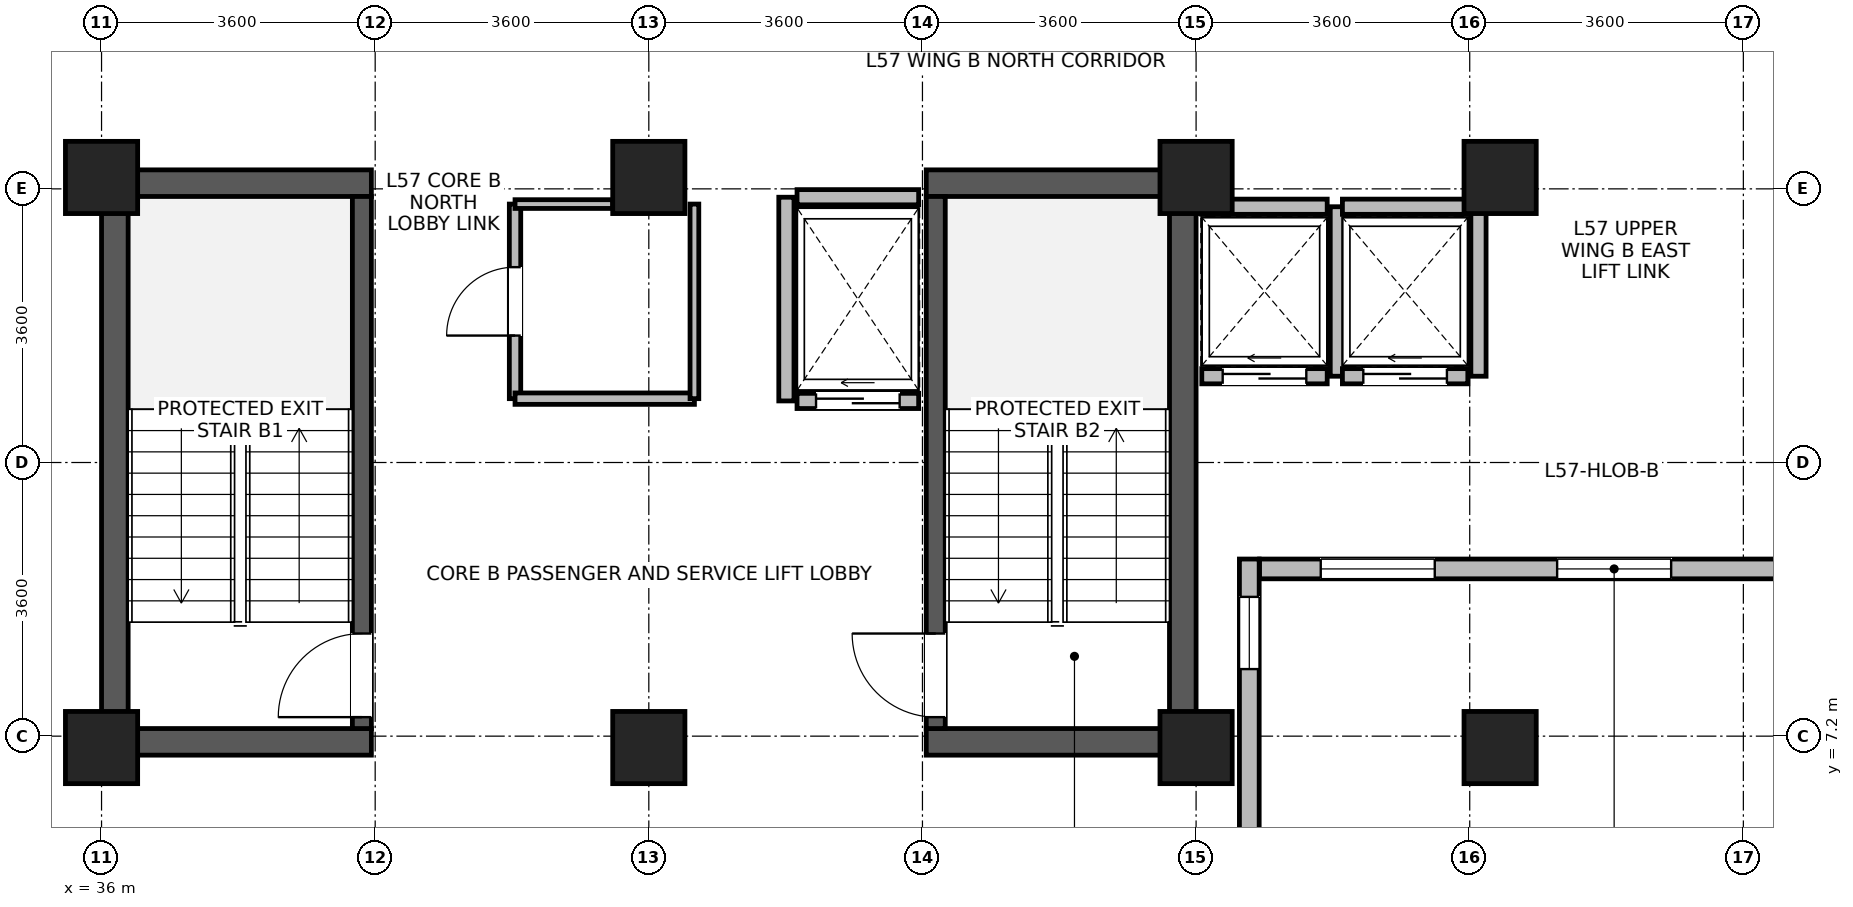
"""IFC4 building model, lengths in metres.
Left out: names, types, materials, properties, quantities, classifications, styles, units other than length and angle.
Written with IfcOpenShell. Run it as: python <this file> out.ifc"""

import sys

from ifc_helpers import new_model, si_unit, direction, frame, frame_2d, origin, origin_2d, place, context, subcontext, project, spatial, rectangle, extrude, source, transform, mapped, element, fill, save


model = new_model("IFC4")
c1 = context("Model", 3, precision=1e-05, world=origin(), true_north=direction((0.0, 1.0)))
c2 = subcontext(c1, "Body", "Model", "MODEL_VIEW")
j1 = project(units=[si_unit("LENGTHUNIT", "METRE"), si_unit("PLANEANGLEUNIT", "RADIAN")], contexts=[c1])
p1 = place(None, origin())
s1 = spatial("IfcSite", under=j1, at=p1, CompositionType="ELEMENT")
p2 = place(p1, origin())
s2 = spatial("IfcBuilding", under=s1, at=p2, CompositionType="ELEMENT")
p3 = place(p2, frame((0.0, 0.0, 224.0)))
s3 = spatial("IfcBuildingStorey", under=s2, at=p3, CompositionType="ELEMENT", Elevation=224.0)
for number, where, z_axis, x_axis in (
    (1, (36.175, 6.95, 0.0), (0.0, 0.0, 1.0), (0.0, 1.0, 0.0)),
    (2, (50.225, 6.95, 0.0), (0.0, 0.0, 1.0), (0.0, 1.0, 0.0)),
):
    element("IfcWall", number, at=place(p3, frame(where, z_axis=z_axis, x_axis=x_axis)), inside=s3, PredefinedType="SHEAR", context=c2, shape_type="SweptSolid", body=[
        extrude(rectangle(XDim=7.7, YDim=0.35, at=frame_2d((3.85, 0.0))), origin(), (0.0, 0.0, 1.0), 3.47),
    ])
for number, where, z_axis, x_axis in (
    (3, (36.35, 7.125, 0.0), (0.0, 0.0, 1.0), (1.0, 0.0, 0.0)),
    (4, (46.85, 7.125, 0.0), (0.0, 0.0, 1.0), (1.0, 0.0, 0.0)),
    (5, (36.35, 14.475, 0.0), (0.0, 0.0, 1.0), (1.0, 0.0, 0.0)),
    (6, (46.85, 14.475, 0.0), (0.0, 0.0, 1.0), (1.0, 0.0, 0.0)),
):
    element("IfcWall", number, at=place(p3, frame(where, z_axis=z_axis, x_axis=x_axis)), inside=s3, PredefinedType="SHEAR", context=c2, shape_type="SweptSolid", body=[
        extrude(rectangle(XDim=3.2, YDim=0.35, at=frame_2d((1.6, 0.0))), origin(), (0.0, 0.0, 1.0), 3.47),
    ])
p4 = place(p3, frame((39.425, 7.3, 0.0), z_axis=(0.0, 0.0, 1.0), x_axis=(0.0, 1.0, 0.0)))
e7 = element("IfcWall", 7, at=p4, inside=s3, PredefinedType="SHEAR", context=c2, shape_type="SweptSolid", body=[
    extrude(rectangle(XDim=7.0, YDim=0.25, at=frame_2d((3.5, 0.0))), origin(), (0.0, 0.0, 1.0), 3.47),
])
p5 = place(p4, frame((0.15, 0.0, 0.0)))
e8 = element("IfcOpeningElement", 8, at=p5, cuts=e7, PredefinedType="OPENING", context=c2, shape_type="SweptSolid", body=[
    extrude(rectangle(XDim=1.1, YDim=2.08, at=frame_2d((0.55, 1.04))), frame((0.0, 0.135, 0.0), z_axis=(0.0, -1.0, 0.0), x_axis=(1.0, 0.0, 0.0)), (0.0, 0.0, 1.0), 0.27),
])
p6 = place(p3, frame((46.975, 7.3, 0.0), z_axis=(0.0, 0.0, 1.0), x_axis=(0.0, 1.0, 0.0)))
e9 = element("IfcWall", 9, at=p6, inside=s3, PredefinedType="SHEAR", context=c2, shape_type="SweptSolid", body=[
    extrude(rectangle(XDim=7.0, YDim=0.25, at=frame_2d((3.5, 0.0))), origin(), (0.0, 0.0, 1.0), 3.47),
])
p7 = place(p6, frame((0.15, 0.0, 0.0)))
e10 = element("IfcOpeningElement", 10, at=p7, cuts=e9, PredefinedType="OPENING", context=c2, shape_type="SweptSolid", body=[
    extrude(rectangle(XDim=1.1, YDim=2.08, at=frame_2d((0.55, 1.04))), frame((0.0, 0.135, 0.0), z_axis=(0.0, -1.0, 0.0), x_axis=(1.0, 0.0, 0.0)), (0.0, 0.0, 1.0), 0.27),
])
m1 = source(origin(), c2, "Body", "SweptSolid", [
    extrude(rectangle(XDim=0.95, YDim=0.95, at=origin_2d()), origin(), (0.0, 0.0, 1.0), 3.7),
])
for number, where, z_axis, x_axis in (
    (11, (36.0, 7.05, 0.0), (0.0, 0.0, 1.0), (1.0, 0.0, 0.0)),
    (12, (36.0, 14.55, 0.0), (0.0, 0.0, 1.0), (1.0, 0.0, 0.0)),
    (13, (43.2, 7.05, 0.0), (0.0, 0.0, 1.0), (1.0, 0.0, 0.0)),
    (14, (43.2, 14.55, 0.0), (0.0, 0.0, 1.0), (1.0, 0.0, 0.0)),
    (15, (50.4, 7.05, 0.0), (0.0, 0.0, 1.0), (1.0, 0.0, 0.0)),
    (16, (50.4, 14.55, 0.0), (0.0, 0.0, 1.0), (1.0, 0.0, 0.0)),
    (17, (54.4, 7.05, 0.0), (0.0, 0.0, 1.0), (1.0, 0.0, 0.0)),
    (18, (54.4, 14.55, 0.0), (0.0, 0.0, 1.0), (1.0, 0.0, 0.0)),
):
    element("IfcColumn", number, at=place(p3, frame(where, z_axis=z_axis, x_axis=x_axis)), inside=s3, PredefinedType="COLUMN", context=c2, shape_type="MappedRepresentation", body=[
        mapped(m1, transform((0.0, 0.0, 0.0), x_axis=(1.0, 0.0, 0.0), y_axis=(0.0, 1.0, 0.0), z_axis=(0.0, 0.0, 1.0), scale=1.0)),
    ])
p8 = place(p3, frame((51.1, 9.53, 0.0), z_axis=(0.0, 0.0, 1.0), x_axis=(0.0, -1.0, 0.0)))
e19 = element("IfcWall", 19, at=p8, inside=s3, PredefinedType="STANDARD", context=c2, shape_type="SweptSolid", body=[
    extrude(rectangle(XDim=3.86, YDim=0.26, at=frame_2d((1.93, 0.0))), origin(), (0.0, 0.0, 1.0), 3.45),
])
p9 = place(p8, frame((0.498, 0.0, 0.85)))
e20 = element("IfcOpeningElement", 20, at=p9, cuts=e19, PredefinedType="OPENING", context=c2, shape_type="SweptSolid", body=[
    extrude(rectangle(XDim=0.95, YDim=1.75, at=frame_2d((0.475, 0.875))), frame((0.0, 0.14, 0.0), z_axis=(0.0, -1.0, 0.0), x_axis=(1.0, 0.0, 0.0)), (0.0, 0.0, 1.0), 0.28),
])
p10 = place(p3, frame((60.565, 9.4, 0.0), z_axis=(0.0, 0.0, 1.0), x_axis=(-1.0, 0.0, 0.0)))
e21 = element("IfcWall", 21, at=p10, inside=s3, PredefinedType="STANDARD", context=c2, shape_type="SweptSolid", body=[
    extrude(rectangle(XDim=9.33, YDim=0.26, at=frame_2d((4.665, 0.0))), origin(), (0.0, 0.0, 1.0), 3.45),
])
p11 = place(p10, frame((0.805, 0.0, 0.85)))
e22 = element("IfcOpeningElement", 22, at=p11, cuts=e21, PredefinedType="OPENING", context=c2, shape_type="SweptSolid", body=[
    extrude(rectangle(XDim=1.5, YDim=1.85, at=frame_2d((0.75, 0.925))), frame((0.0, 0.14, 0.0), z_axis=(0.0, -1.0, 0.0), x_axis=(1.0, 0.0, 0.0)), (0.0, 0.0, 1.0), 0.28),
])
p12 = place(p10, frame((3.915, 0.0, 0.85)))
e23 = element("IfcOpeningElement", 23, at=p12, cuts=e21, PredefinedType="OPENING", context=c2, shape_type="SweptSolid", body=[
    extrude(rectangle(XDim=1.5, YDim=1.85, at=frame_2d((0.75, 0.925))), frame((0.0, 0.14, 0.0), z_axis=(0.0, -1.0, 0.0), x_axis=(1.0, 0.0, 0.0)), (0.0, 0.0, 1.0), 0.28),
])
p13 = place(p10, frame((7.025, 0.0, 0.85)))
e24 = element("IfcOpeningElement", 24, at=p13, cuts=e21, PredefinedType="OPENING", context=c2, shape_type="SweptSolid", body=[
    extrude(rectangle(XDim=1.5, YDim=1.85, at=frame_2d((0.75, 0.925))), frame((0.0, 0.14, 0.0), z_axis=(0.0, -1.0, 0.0), x_axis=(1.0, 0.0, 0.0)), (0.0, 0.0, 1.0), 0.28),
])
p14 = place(p3, frame((50.475, 11.935, 0.0), z_axis=(0.0, 0.0, 1.0), x_axis=(1.0, 0.0, 0.0)))
e25 = element("IfcWall", 25, at=p14, inside=s3, PredefinedType="PARTITIONING", context=c2, shape_type="SweptSolid", body=[
    extrude(rectangle(XDim=1.65, YDim=0.2, at=frame_2d((0.825, 0.0))), origin(), (0.0, 0.0, 1.0), 3.45),
])
p15 = place(p14, frame((0.275, 0.0, 0.0)))
e26 = element("IfcOpeningElement", 26, at=p15, cuts=e25, PredefinedType="OPENING", context=c2, shape_type="SweptSolid", body=[
    extrude(rectangle(XDim=1.1, YDim=2.12, at=frame_2d((0.55, 1.06))), frame((0.0, 0.11, 0.0), z_axis=(0.0, -1.0, 0.0), x_axis=(1.0, 0.0, 0.0)), (0.0, 0.0, 1.0), 0.22),
])
p16 = place(p3, frame((50.475, 14.165, 0.0), z_axis=(0.0, 0.0, 1.0), x_axis=(1.0, 0.0, 0.0)))
e27 = element("IfcWall", 27, at=p16, inside=s3, PredefinedType="PARTITIONING", context=c2, shape_type="SweptSolid", body=[
    extrude(rectangle(XDim=1.65, YDim=0.2, at=frame_2d((0.825, 0.0))), origin(), (0.0, 0.0, 1.0), 3.45),
])
p17 = place(p3, frame((52.265, 11.935, 0.0), z_axis=(0.0, 0.0, 1.0), x_axis=(0.0, 1.0, 0.0)))
e28 = element("IfcWall", 28, at=p17, inside=s3, PredefinedType="PARTITIONING", context=c2, shape_type="SweptSolid", body=[
    extrude(rectangle(XDim=2.23, YDim=0.2, at=frame_2d((1.115, 0.0))), origin(), (0.0, 0.0, 1.0), 3.45),
])
p18 = place(p3, frame((52.325, 11.935, 0.0), z_axis=(0.0, 0.0, 1.0), x_axis=(1.0, 0.0, 0.0)))
e29 = element("IfcWall", 29, at=p18, inside=s3, PredefinedType="PARTITIONING", context=c2, shape_type="SweptSolid", body=[
    extrude(rectangle(XDim=1.65, YDim=0.2, at=frame_2d((0.825, 0.0))), origin(), (0.0, 0.0, 1.0), 3.45),
])
p19 = place(p18, frame((0.275, 0.0, 0.0)))
e30 = element("IfcOpeningElement", 30, at=p19, cuts=e29, PredefinedType="OPENING", context=c2, shape_type="SweptSolid", body=[
    extrude(rectangle(XDim=1.1, YDim=2.12, at=frame_2d((0.55, 1.06))), frame((0.0, 0.11, 0.0), z_axis=(0.0, -1.0, 0.0), x_axis=(1.0, 0.0, 0.0)), (0.0, 0.0, 1.0), 0.22),
])
p20 = place(p3, frame((52.325, 14.165, 0.0), z_axis=(0.0, 0.0, 1.0), x_axis=(1.0, 0.0, 0.0)))
e31 = element("IfcWall", 31, at=p20, inside=s3, PredefinedType="PARTITIONING", context=c2, shape_type="SweptSolid", body=[
    extrude(rectangle(XDim=1.65, YDim=0.2, at=frame_2d((0.825, 0.0))), origin(), (0.0, 0.0, 1.0), 3.45),
])
p21 = place(p3, frame((54.115, 11.935, 0.0), z_axis=(0.0, 0.0, 1.0), x_axis=(0.0, 1.0, 0.0)))
e32 = element("IfcWall", 32, at=p21, inside=s3, PredefinedType="PARTITIONING", context=c2, shape_type="SweptSolid", body=[
    extrude(rectangle(XDim=2.23, YDim=0.2, at=frame_2d((1.115, 0.0))), origin(), (0.0, 0.0, 1.0), 3.45),
])
p22 = place(p3, frame((45.15, 11.61, 0.0), z_axis=(0.0, 0.0, 1.0), x_axis=(1.0, 0.0, 0.0)))
e33 = element("IfcWall", 33, at=p22, inside=s3, PredefinedType="PARTITIONING", context=c2, shape_type="SweptSolid", body=[
    extrude(rectangle(XDim=1.6, YDim=0.2, at=frame_2d((0.8, 0.0))), origin(), (0.0, 0.0, 1.0), 3.45),
])
p23 = place(p22, frame((0.25, 0.0, 0.0)))
e34 = element("IfcOpeningElement", 34, at=p23, cuts=e33, PredefinedType="OPENING", context=c2, shape_type="SweptSolid", body=[
    extrude(rectangle(XDim=1.1, YDim=2.12, at=frame_2d((0.55, 1.06))), frame((0.0, 0.11, 0.0), z_axis=(0.0, -1.0, 0.0), x_axis=(1.0, 0.0, 0.0)), (0.0, 0.0, 1.0), 0.22),
])
p24 = place(p3, frame((45.15, 14.29, 0.0), z_axis=(0.0, 0.0, 1.0), x_axis=(1.0, 0.0, 0.0)))
e35 = element("IfcWall", 35, at=p24, inside=s3, PredefinedType="PARTITIONING", context=c2, shape_type="SweptSolid", body=[
    extrude(rectangle(XDim=1.6, YDim=0.2, at=frame_2d((0.8, 0.0))), origin(), (0.0, 0.0, 1.0), 2.55),
])
p25 = place(p3, frame((45.01, 11.61, 0.0), z_axis=(0.0, 0.0, 1.0), x_axis=(0.0, 1.0, 0.0)))
e36 = element("IfcWall", 36, at=p25, inside=s3, PredefinedType="PARTITIONING", context=c2, shape_type="SweptSolid", body=[
    extrude(rectangle(XDim=2.68, YDim=0.2, at=frame_2d((1.34, 0.0))), origin(), (0.0, 0.0, 1.0), 3.45),
])
p26 = place(p3, frame((41.44, 11.64, 0.0), z_axis=(0.0, 0.0, 1.0), x_axis=(0.0, 1.0, 0.0)))
e37 = element("IfcWall", 37, at=p26, inside=s3, PredefinedType="PARTITIONING", context=c2, shape_type="SweptSolid", body=[
    extrude(rectangle(XDim=2.56, YDim=0.15, at=frame_2d((1.28, 0.0))), origin(), (0.0, 0.0, 1.0), 3.45),
])
p27 = place(p26, frame((0.83, 0.0, 0.0)))
e38 = element("IfcOpeningElement", 38, at=p27, cuts=e37, PredefinedType="OPENING", context=c2, shape_type="SweptSolid", body=[
    extrude(rectangle(XDim=0.9, YDim=2.08, at=frame_2d((0.45, 1.04))), frame((0.0, 0.085, 0.0), z_axis=(0.0, -1.0, 0.0), x_axis=(1.0, 0.0, 0.0)), (0.0, 0.0, 1.0), 0.17),
])
p28 = place(p3, frame((41.44, 11.64, 0.0), z_axis=(0.0, 0.0, 1.0), x_axis=(1.0, 0.0, 0.0)))
e39 = element("IfcWall", 39, at=p28, inside=s3, PredefinedType="PARTITIONING", context=c2, shape_type="SweptSolid", body=[
    extrude(rectangle(XDim=2.36, YDim=0.15, at=frame_2d((1.18, 0.0))), origin(), (0.0, 0.0, 1.0), 3.45),
])
p29 = place(p3, frame((43.8, 11.64, 0.0), z_axis=(0.0, 0.0, 1.0), x_axis=(0.0, 1.0, 0.0)))
e40 = element("IfcWall", 40, at=p29, inside=s3, PredefinedType="PARTITIONING", context=c2, shape_type="SweptSolid", body=[
    extrude(rectangle(XDim=2.56, YDim=0.115, at=frame_2d((1.28, 0.0))), origin(), (0.0, 0.0, 1.0), 3.45),
])
p30 = place(p3, frame((41.44, 14.2, 0.0), z_axis=(0.0, 0.0, 1.0), x_axis=(1.0, 0.0, 0.0)))
e41 = element("IfcWall", 41, at=p30, inside=s3, PredefinedType="PARTITIONING", context=c2, shape_type="SweptSolid", body=[
    extrude(rectangle(XDim=1.285, YDim=0.115, at=frame_2d((0.643, 0.0))), origin(), (0.0, 0.0, 1.0), 2.55),
])
p31 = place(p9, origin())
e42 = element("IfcWindow", 42, at=p31, inside=s3, PartitioningType="SINGLE_PANEL", PredefinedType="WINDOW", context=c2, shape_type="SweptSolid", body=[
    extrude(rectangle(XDim=0.95, YDim=1.75, at=frame_2d((0.475, 0.875))), frame((0.0, 0.03, 0.0), z_axis=(0.0, -1.0, 0.0), x_axis=(1.0, 0.0, 0.0)), (0.0, 0.0, 1.0), 0.06),
])
fill(e20, e42)
p32 = place(p12, origin())
e43 = element("IfcWindow", 43, at=p32, inside=s3, PartitioningType="SINGLE_PANEL", PredefinedType="WINDOW", context=c2, shape_type="SweptSolid", body=[
    extrude(rectangle(XDim=1.5, YDim=1.85, at=frame_2d((0.75, 0.925))), frame((0.0, 0.03, 0.0), z_axis=(0.0, -1.0, 0.0), x_axis=(1.0, 0.0, 0.0)), (0.0, 0.0, 1.0), 0.06),
])
fill(e23, e43)
p33 = place(p13, origin())
e44 = element("IfcWindow", 44, at=p33, inside=s3, PartitioningType="SINGLE_PANEL", PredefinedType="WINDOW", context=c2, shape_type="SweptSolid", body=[
    extrude(rectangle(XDim=1.5, YDim=1.85, at=frame_2d((0.75, 0.925))), frame((0.0, 0.03, 0.0), z_axis=(0.0, -1.0, 0.0), x_axis=(1.0, 0.0, 0.0)), (0.0, 0.0, 1.0), 0.06),
])
fill(e24, e44)
p34 = place(p5, origin())
e45 = element("IfcDoor", 45, at=p34, inside=s3, OperationType="SINGLE_SWING_LEFT", PredefinedType="DOOR", context=c2, shape_type="SweptSolid", body=[
    extrude(rectangle(XDim=1.1, YDim=2.08, at=frame_2d((0.55, 1.04))), frame((0.0, 0.025, 0.0), z_axis=(0.0, -1.0, 0.0), x_axis=(1.0, 0.0, 0.0)), (0.0, 0.0, 1.0), 0.05),
])
fill(e8, e45)
p35 = place(p7, origin())
e46 = element("IfcDoor", 46, at=p35, inside=s3, OperationType="SINGLE_SWING_RIGHT", PredefinedType="DOOR", context=c2, shape_type="SweptSolid", body=[
    extrude(rectangle(XDim=1.1, YDim=2.08, at=frame_2d((0.55, 1.04))), frame((0.0, 0.025, 0.0), z_axis=(0.0, -1.0, 0.0), x_axis=(1.0, 0.0, 0.0)), (0.0, 0.0, 1.0), 0.05),
])
fill(e10, e46)
p36 = place(p15, origin())
e47 = element("IfcDoor", 47, at=p36, inside=s3, OperationType="SLIDING_TO_LEFT", PredefinedType="DOOR", context=c2, shape_type="SweptSolid", body=[
    extrude(rectangle(XDim=1.1, YDim=2.12, at=frame_2d((0.55, 1.06))), frame((0.0, 0.025, 0.0), z_axis=(0.0, -1.0, 0.0), x_axis=(1.0, 0.0, 0.0)), (0.0, 0.0, 1.0), 0.05),
])
fill(e26, e47)
p37 = place(p19, origin())
e48 = element("IfcDoor", 48, at=p37, inside=s3, OperationType="SLIDING_TO_LEFT", PredefinedType="DOOR", context=c2, shape_type="SweptSolid", body=[
    extrude(rectangle(XDim=1.1, YDim=2.12, at=frame_2d((0.55, 1.06))), frame((0.0, 0.025, 0.0), z_axis=(0.0, -1.0, 0.0), x_axis=(1.0, 0.0, 0.0)), (0.0, 0.0, 1.0), 0.05),
])
fill(e30, e48)
p38 = place(p23, origin())
e49 = element("IfcDoor", 49, at=p38, inside=s3, OperationType="SLIDING_TO_LEFT", PredefinedType="DOOR", context=c2, shape_type="SweptSolid", body=[
    extrude(rectangle(XDim=1.1, YDim=2.12, at=frame_2d((0.55, 1.06))), frame((0.0, 0.025, 0.0), z_axis=(0.0, -1.0, 0.0), x_axis=(1.0, 0.0, 0.0)), (0.0, 0.0, 1.0), 0.05),
])
fill(e34, e49)
p39 = place(p27, origin())
e50 = element("IfcDoor", 50, at=p39, inside=s3, OperationType="SINGLE_SWING_LEFT", PredefinedType="DOOR", context=c2, shape_type="SweptSolid", body=[
    extrude(rectangle(XDim=0.9, YDim=2.08, at=frame_2d((0.45, 1.04))), frame((0.0, 0.025, 0.0), z_axis=(0.0, -1.0, 0.0), x_axis=(1.0, 0.0, 0.0)), (0.0, 0.0, 1.0), 0.05),
])
fill(e38, e50)
save(model, sys.argv[1])
